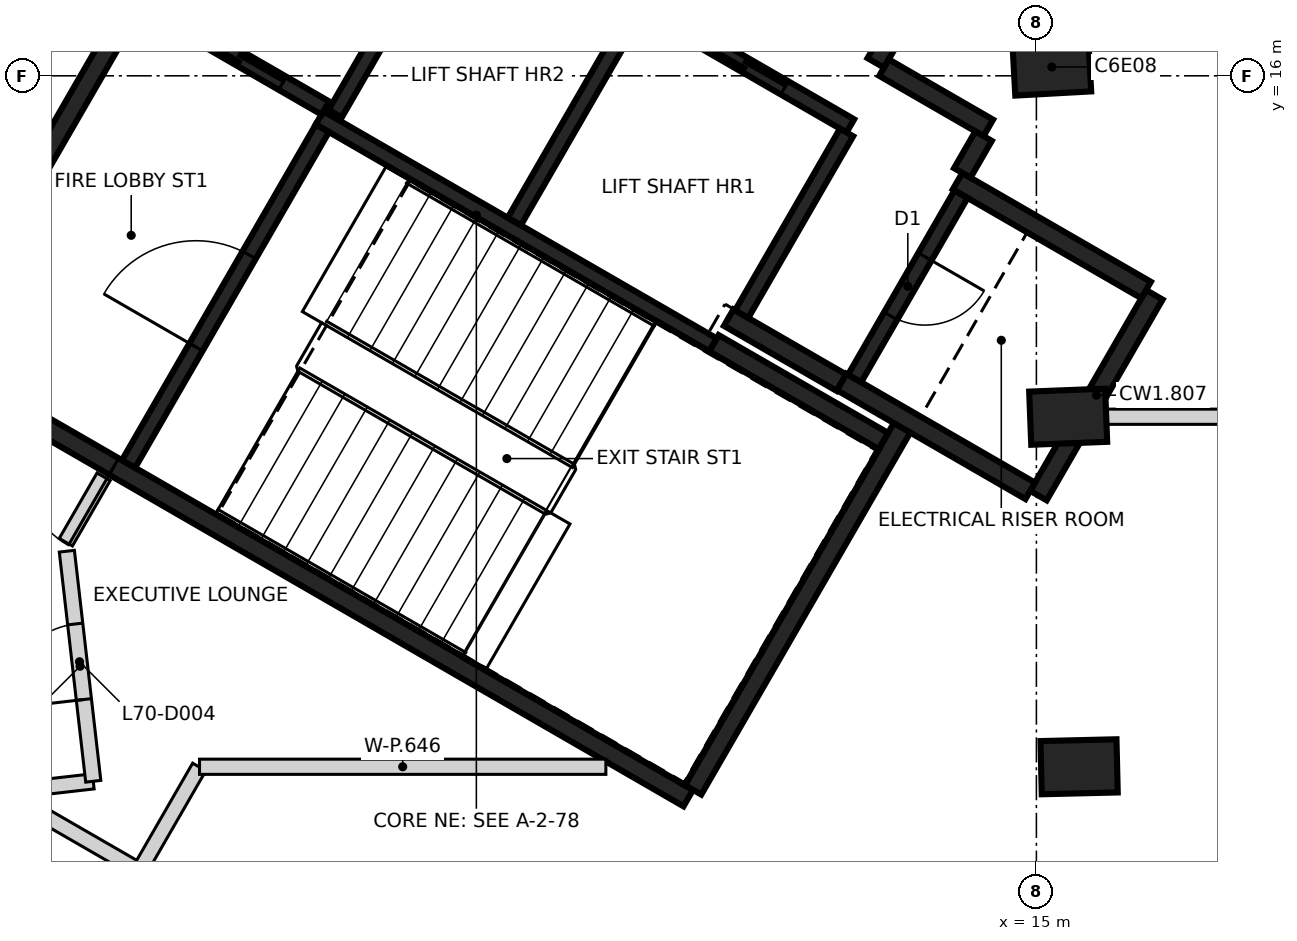
"""IFC4 building model, lengths in metres.
Left out: names, types, materials, properties, quantities, classifications, styles, units other than length and angle.
Written with IfcOpenShell. Run it as: python <this file> out.ifc"""

import sys

from ifc_helpers import new_model, si_unit, direction, frame, frame_2d, origin, origin_2d, place, context, subcontext, project, spatial, rectangle, extrude, element, fill, save


model = new_model("IFC4")
c1 = context("Model", 3, precision=1e-05, world=origin(), true_north=direction((0.0, 1.0)))
c2 = subcontext(c1, "Body", "Model", "MODEL_VIEW")
j1 = project(units=[si_unit("LENGTHUNIT", "METRE"), si_unit("PLANEANGLEUNIT", "RADIAN")], contexts=[c1])
p1 = place(None, origin())
s1 = spatial("IfcSite", under=j1, at=p1, CompositionType="ELEMENT")
p2 = place(p1, origin())
s2 = spatial("IfcBuilding", under=s1, at=p2, CompositionType="ELEMENT")
p3 = place(p2, frame((0.0, 0.0, 276.6)))
s3 = spatial("IfcBuildingStorey", under=s2, at=p3, CompositionType="ELEMENT", Elevation=276.6)
for number, where, z_axis, x_axis in (
    (1, (15.562, 6.91, -0.35), (0.0, 0.0, 1.0), (1.0, 0.024, 0.0)),
    (2, (15.418, 11.515, -0.35), (0.0, 0.0, 1.0), (0.999, 0.039, 0.0)),
    (3, (15.202, 16.117, -0.35), (0.0, 0.0, 1.0), (0.998, 0.055, 0.0)),
):
    element("IfcColumn", number, at=place(p3, frame(where, z_axis=z_axis, x_axis=x_axis)), inside=s3, PredefinedType="COLUMN", context=c2, shape_type="SweptSolid", body=[
        extrude(rectangle(XDim=1.0, YDim=0.7, at=origin_2d()), origin(), (0.0, 0.0, 1.0), 3.6),
    ])
p4 = place(p3, frame((10.42, 6.498, 0.0), z_axis=(0.0, 0.0, 1.0), x_axis=(-0.866021906294, 0.500006057782, 0.0)))
e4 = element("IfcWall", 4, at=p4, inside=s3, PredefinedType="SHEAR", context=c2, shape_type="SweptSolid", body=[
    extrude(rectangle(XDim=11.55, YDim=0.25, at=frame_2d((5.775, 0.0))), origin(), (0.0, 0.0, 1.0), 3.25),
])
p5 = place(p4, frame((10.025, 0.0, 0.0)))
e5 = element("IfcOpeningElement", 5, at=p5, cuts=e4, PredefinedType="OPENING", context=c2, shape_type="SweptSolid", body=[
    extrude(rectangle(XDim=1.2, YDim=2.1, at=frame_2d((0.6, 1.05))), frame((0.0, 0.135, 0.0), z_axis=(0.0, -1.0, 0.0), x_axis=(1.0, 0.0, 0.0)), (0.0, 0.0, 1.0), 0.27),
])
p6 = place(p4, frame((8.725, 0.0, 0.0)))
e6 = element("IfcOpeningElement", 6, at=p6, cuts=e4, PredefinedType="OPENING", context=c2, shape_type="SweptSolid", body=[
    extrude(rectangle(XDim=1.2, YDim=2.1, at=frame_2d((0.6, 1.05))), frame((0.0, 0.135, 0.0), z_axis=(0.0, -1.0, 0.0), x_axis=(1.0, 0.0, 0.0)), (0.0, 0.0, 1.0), 0.27),
])
p7 = place(p3, frame((0.48, 12.381, 0.0), z_axis=(0.0, 0.0, 1.0), x_axis=(0.49999885962, 0.866026062182, 0.0)))
e7 = element("IfcWall", 7, at=p7, inside=s3, PredefinedType="SHEAR", context=c2, shape_type="SweptSolid", body=[
    extrude(rectangle(XDim=5.225, YDim=0.25, at=frame_2d((2.612, 0.0))), origin(), (0.0, 0.0, 1.0), 3.25),
])
p8 = place(p3, frame((13.238, 11.378, 0.0), z_axis=(0.0, 0.0, 1.0), x_axis=(-0.500008851346, -0.866020293397, 0.0)))
e8 = element("IfcWall", 8, at=p8, inside=s3, PredefinedType="SHEAR", context=c2, shape_type="SweptSolid", body=[
    extrude(rectangle(XDim=5.51, YDim=0.25, at=frame_2d((2.755, 0.0))), origin(), (0.0, 0.0, 1.0), 3.25),
])
p9 = place(p3, frame((16.552, 13.119, 0.0), z_axis=(0.0, 0.0, 1.0), x_axis=(-0.499978833458, -0.866037623948, 0.0)))
e9 = element("IfcWall", 9, at=p9, inside=s3, PredefinedType="SHEAR", context=c2, shape_type="SweptSolid", body=[
    extrude(rectangle(XDim=3.05, YDim=0.25, at=frame_2d((1.525, 0.0))), origin(), (0.0, 0.0, 1.0), 3.25),
])
p10 = place(p3, frame((14.918, 10.54, 0.0), z_axis=(0.0, 0.0, 1.0), x_axis=(-0.866063538972, 0.499933942099, 0.0)))
e10 = element("IfcWall", 10, at=p10, inside=s3, PredefinedType="SHEAR", context=c2, shape_type="SweptSolid", body=[
    extrude(rectangle(XDim=2.865, YDim=0.25, at=frame_2d((1.432, 0.0))), origin(), (0.0, 0.0, 1.0), 3.25),
])
p11 = place(p3, frame((13.963, 14.614, 0.0), z_axis=(0.0, 0.0, 1.0), x_axis=(0.866042235819, -0.499970844928, 0.0)))
e11 = element("IfcWall", 11, at=p11, inside=s3, PredefinedType="SHEAR", context=c2, shape_type="SweptSolid", body=[
    extrude(rectangle(XDim=2.865, YDim=0.25, at=frame_2d((1.432, 0.0))), origin(), (0.0, 0.0, 1.0), 3.25),
])
p12 = place(p3, frame((10.757, 12.481, 0.0), z_axis=(0.0, 0.0, 1.0), x_axis=(0.866022940537, -0.500004266446, 0.0)))
e12 = element("IfcWall", 12, at=p12, inside=s3, PredefinedType="SHEAR", context=c2, shape_type="SweptSolid", body=[
    extrude(rectangle(XDim=2.575, YDim=0.25, at=frame_2d((1.287, 0.0))), origin(), (0.0, 0.0, 1.0), 3.25),
])
p13 = place(p3, frame((13.819, 17.785, 0.0), z_axis=(0.0, 0.0, 1.0), x_axis=(-0.500039802285, -0.866002422705, 0.0)))
e13 = element("IfcWall", 13, at=p13, inside=s3, PredefinedType="SHEAR", context=c2, shape_type="SweptSolid", body=[
    extrude(rectangle(XDim=1.865, YDim=0.25, at=frame_2d((0.932, 0.0))), origin(), (0.0, 0.0, 1.0), 3.25),
])
p14 = place(p3, frame((12.433, 11.964, 0.0), z_axis=(0.0, 0.0, 1.0), x_axis=(-0.866038183914, 0.499977863513, 0.0)))
e14 = element("IfcWall", 14, at=p14, inside=s3, PredefinedType="SHEAR", context=c2, shape_type="SweptSolid", body=[
    extrude(rectangle(XDim=1.71, YDim=0.25, at=frame_2d((0.855, 0.0))), origin(), (0.0, 0.0, 1.0), 3.25),
])
p15 = place(p3, frame((12.995, 16.108, 0.0), z_axis=(0.0, 0.0, 1.0), x_axis=(0.866044474677, -0.49996696679, 0.0)))
e15 = element("IfcWall", 15, at=p15, inside=s3, PredefinedType="SHEAR", context=c2, shape_type="SweptSolid", body=[
    extrude(rectangle(XDim=1.584, YDim=0.25, at=frame_2d((0.792, 0.0))), origin(), (0.0, 0.0, 1.0), 3.25),
])
p16 = place(p3, frame((14.305, 15.207, 0.0), z_axis=(0.0, 0.0, 1.0), x_axis=(-0.499848422343, -0.866112899501, 0.0)))
e16 = element("IfcWall", 16, at=p16, inside=s3, PredefinedType="SHEAR", context=c2, shape_type="SweptSolid", body=[
    extrude(rectangle(XDim=0.559, YDim=0.25, at=frame_2d((0.28, 0.0))), origin(), (0.0, 0.0, 1.0), 3.25),
])
p17 = place(p3, frame((12.552, 15.342, 0.0), z_axis=(0.0, 0.0, 1.0), x_axis=(-0.866030299012, 0.499991521122, 0.0)))
e17 = element("IfcWall", 17, at=p17, inside=s3, PredefinedType="SHEAR", context=c2, shape_type="SweptSolid", body=[
    extrude(rectangle(XDim=6.1, YDim=0.2, at=frame_2d((3.05, 0.0))), origin(), (0.0, 0.0, 1.0), 3.25),
])
p18 = place(p17, frame((1.0, 0.0, 0.0)))
e18 = element("IfcOpeningElement", 18, at=p18, cuts=e17, PredefinedType="OPENING", context=c2, shape_type="SweptSolid", body=[
    extrude(rectangle(XDim=1.2, YDim=2.1, at=frame_2d((0.6, 1.05))), frame((0.0, 0.11, 0.0), z_axis=(0.0, -1.0, 0.0), x_axis=(1.0, 0.0, 0.0)), (0.0, 0.0, 1.0), 0.22),
])
p19 = place(p17, frame((3.982, 0.0, 0.0)))
e19 = element("IfcOpeningElement", 19, at=p19, cuts=e17, PredefinedType="OPENING", context=c2, shape_type="SweptSolid", body=[
    extrude(rectangle(XDim=1.2, YDim=2.1, at=frame_2d((0.6, 1.05))), frame((0.0, 0.11, 0.0), z_axis=(0.0, -1.0, 0.0), x_axis=(1.0, 0.0, 0.0)), (0.0, 0.0, 1.0), 0.22),
])
p20 = place(p3, frame((10.743, 12.46, 0.0), z_axis=(0.0, 0.0, 1.0), x_axis=(-0.866018848283, 0.500011354289, 0.0)))
e20 = element("IfcWall", 20, at=p20, inside=s3, PredefinedType="SHEAR", context=c2, shape_type="SweptSolid", body=[
    extrude(rectangle(XDim=5.974, YDim=0.2, at=frame_2d((2.987, 0.0))), origin(), (0.0, 0.0, 1.0), 3.25),
])
p21 = place(p3, frame((3.057, 10.895, 0.0), z_axis=(0.0, 0.0, 1.0), x_axis=(0.500027839223, 0.866009330205, 0.0)))
e21 = element("IfcWall", 21, at=p21, inside=s3, PredefinedType="SHEAR", context=c2, shape_type="SweptSolid", body=[
    extrude(rectangle(XDim=5.098, YDim=0.2, at=frame_2d((2.549, 0.0))), origin(), (0.0, 0.0, 1.0), 3.25),
])
p22 = place(p21, frame((1.774, 0.0, 0.0)))
e22 = element("IfcOpeningElement", 22, at=p22, cuts=e21, PredefinedType="OPENING", context=c2, shape_type="SweptSolid", body=[
    extrude(rectangle(XDim=1.4, YDim=2.1, at=frame_2d((0.7, 1.05))), frame((0.0, 0.11, 0.0), z_axis=(0.0, -1.0, 0.0), x_axis=(1.0, 0.0, 0.0)), (0.0, 0.0, 1.0), 0.22),
])
p23 = place(p3, frame((8.132, 14.084, 0.0), z_axis=(0.0, 0.0, 1.0), x_axis=(0.500030834389, 0.86600760081, 0.0)))
e23 = element("IfcWall", 23, at=p23, inside=s3, PredefinedType="SHEAR", context=c2, shape_type="SweptSolid", body=[
    extrude(rectangle(XDim=3.198, YDim=0.2, at=frame_2d((1.599, 0.0))), origin(), (0.0, 0.0, 1.0), 3.25),
])
p24 = place(p3, frame((14.008, 14.442, 0.0), z_axis=(0.0, 0.0, 1.0), x_axis=(-0.499986818241, -0.866033014143, 0.0)))
e24 = element("IfcWall", 24, at=p24, inside=s3, PredefinedType="SHEAR", context=c2, shape_type="SweptSolid", body=[
    extrude(rectangle(XDim=2.798, YDim=0.2, at=frame_2d((1.399, 0.0))), origin(), (0.0, 0.0, 1.0), 3.25),
])
p25 = place(p24, frame((0.949, 0.0, 0.0)))
e25 = element("IfcOpeningElement", 25, at=p25, cuts=e24, PredefinedType="OPENING", context=c2, shape_type="SweptSolid", body=[
    extrude(rectangle(XDim=0.9, YDim=2.1, at=frame_2d((0.45, 1.05))), frame((0.0, 0.11, 0.0), z_axis=(0.0, -1.0, 0.0), x_axis=(1.0, 0.0, 0.0)), (0.0, 0.0, 1.0), 0.22),
])
p26 = place(p3, frame((12.502, 15.255, 0.0), z_axis=(0.0, 0.0, 1.0), x_axis=(-0.499965018551, -0.866045599391, 0.0)))
e26 = element("IfcWall", 26, at=p26, inside=s3, PredefinedType="SHEAR", context=c2, shape_type="SweptSolid", body=[
    extrude(rectangle(XDim=2.759, YDim=0.2, at=frame_2d((1.379, 0.0))), origin(), (0.0, 0.0, 1.0), 3.25),
])
p27 = place(p3, frame((7.324, 18.187, 0.0), z_axis=(0.0, 0.0, 1.0), x_axis=(-0.499967891604, -0.866043940782, 0.0)))
e27 = element("IfcWall", 27, at=p27, inside=s3, PredefinedType="SHEAR", context=c2, shape_type="SweptSolid", body=[
    extrude(rectangle(XDim=3.1, YDim=0.2, at=frame_2d((1.55, 0.0))), origin(), (0.0, 0.0, 1.0), 3.25),
])
p28 = place(p3, frame((5.646, 15.576, 0.0), z_axis=(0.0, 0.0, 1.0), x_axis=(-0.866018407898, 0.500012117035, 0.0)))
e28 = element("IfcWall", 28, at=p28, inside=s3, PredefinedType="SHEAR", context=c2, shape_type="SweptSolid", body=[
    extrude(rectangle(XDim=2.651, YDim=0.2, at=frame_2d((1.325, 0.0))), origin(), (0.0, 0.0, 1.0), 3.25),
])
p29 = place(p28, frame((0.652, 0.0, 0.0)))
e29 = element("IfcOpeningElement", 29, at=p29, cuts=e28, PredefinedType="OPENING", context=c2, shape_type="SweptSolid", body=[
    extrude(rectangle(XDim=1.3, YDim=2.1, at=frame_2d((0.65, 1.05))), frame((0.0, 0.11, 0.0), z_axis=(0.0, -1.0, 0.0), x_axis=(1.0, 0.0, 0.0)), (0.0, 0.0, 1.0), 0.22),
])
p30 = place(p3, frame((-1.086, 12.65, 0.0), z_axis=(0.0, 0.0, 1.0), x_axis=(0.492563383526, 0.870276572826, 0.0)))
e30 = element("IfcWall", 30, at=p30, inside=s3, PredefinedType="PARTITIONING", context=c2, shape_type="SweptSolid", body=[
    extrude(rectangle(XDim=6.309, YDim=0.2, at=frame_2d((3.155, 0.0))), origin(), (0.0, 0.0, 1.0), 3.25),
])
p31 = place(p30, frame((3.533, 0.0, 0.0)))
e31 = element("IfcOpeningElement", 31, at=p31, cuts=e30, PredefinedType="OPENING", context=c2, shape_type="SweptSolid", body=[
    extrude(rectangle(XDim=1.0, YDim=2.1, at=frame_2d((0.5, 1.05))), frame((0.0, 0.11, 0.0), z_axis=(0.0, -1.0, 0.0), x_axis=(1.0, 0.0, 0.0)), (0.0, 0.0, 1.0), 0.22),
])
p32 = place(p3, frame((1.4, 6.582, 0.0), z_axis=(0.0, 0.0, 1.0), x_axis=(0.993556915844, 0.11333426216, 0.0)))
e32 = element("IfcWall", 32, at=p32, inside=s3, PredefinedType="PARTITIONING", context=c2, shape_type="SweptSolid", body=[
    extrude(rectangle(XDim=1.2, YDim=0.2, at=frame_2d((0.6, 0.0))), origin(), (0.0, 0.0, 1.0), 3.25),
])
p33 = place(p3, frame((1.4, 6.582, 0.0), z_axis=(0.0, 0.0, 1.0), x_axis=(0.866066271601, -0.499929208183, 0.0)))
e33 = element("IfcWall", 33, at=p33, inside=s3, PredefinedType="PARTITIONING", context=c2, shape_type="SweptSolid", body=[
    extrude(rectangle(XDim=2.078, YDim=0.2, at=frame_2d((1.039, 0.0))), origin(), (0.0, 0.0, 1.0), 3.25),
])
p34 = place(p3, frame((2.592, 6.719, 0.0), z_axis=(0.0, 0.0, 1.0), x_axis=(-0.114027951455, 0.993477541914, 0.0)))
e34 = element("IfcWall", 34, at=p34, inside=s3, PredefinedType="PARTITIONING", context=c2, shape_type="SweptSolid", body=[
    extrude(rectangle(XDim=3.047, YDim=0.2, at=frame_2d((1.523, 0.0))), origin(), (0.0, 0.0, 1.0), 3.25),
])
p35 = place(p34, frame((1.083, 0.0, 0.0)))
e35 = element("IfcOpeningElement", 35, at=p35, cuts=e34, PredefinedType="OPENING", context=c2, shape_type="SweptSolid", body=[
    extrude(rectangle(XDim=1.0, YDim=2.1, at=frame_2d((0.5, 1.05))), frame((0.0, 0.11, 0.0), z_axis=(0.0, -1.0, 0.0), x_axis=(1.0, 0.0, 0.0)), (0.0, 0.0, 1.0), 0.22),
])
p36 = place(p3, frame((2.231, 9.864, 0.0), z_axis=(0.0, 0.0, 1.0), x_axis=(0.499942098031, 0.866058830921, 0.0)))
e36 = element("IfcWall", 36, at=p36, inside=s3, PredefinedType="PARTITIONING", context=c2, shape_type="SweptSolid", body=[
    extrude(rectangle(XDim=0.994, YDim=0.2, at=frame_2d((0.497, 0.0))), origin(), (0.0, 0.0, 1.0), 3.25),
])
p37 = place(p3, frame((3.2, 5.543, 0.0), z_axis=(0.0, 0.0, 1.0), x_axis=(0.499342032259, 0.86640494852, 0.0)))
e37 = element("IfcWall", 37, at=p37, inside=s3, PredefinedType="PARTITIONING", context=c2, shape_type="SweptSolid", body=[
    extrude(rectangle(XDim=1.574, YDim=0.2, at=frame_2d((0.787, 0.0))), origin(), (0.0, 0.0, 1.0), 3.25),
])
p38 = place(p3, frame((3.99, 6.91, 0.0), z_axis=(0.0, 0.0, 1.0), x_axis=(1.0, 0.0, 0.0)))
e38 = element("IfcWall", 38, at=p38, inside=s3, PredefinedType="PARTITIONING", context=c2, shape_type="SweptSolid", body=[
    extrude(rectangle(XDim=5.346, YDim=0.2, at=frame_2d((2.673, 0.0))), origin(), (0.0, 0.0, 1.0), 3.25),
])
p39 = place(p3, frame((15.84, 11.515, 0.0), z_axis=(0.0, 0.0, 1.0), x_axis=(1.0, 0.0, 0.0)))
e39 = element("IfcWall", 39, at=p39, inside=s3, PredefinedType="PARTITIONING", context=c2, shape_type="SweptSolid", body=[
    extrude(rectangle(XDim=2.025, YDim=0.2, at=frame_2d((1.012, 0.0))), origin(), (0.0, 0.0, 1.0), 3.25),
])
p40 = place(p29, origin())
e40 = element("IfcDoor", 40, at=p40, inside=s3, OperationType="SLIDING_TO_RIGHT", PredefinedType="DOOR", context=c2, shape_type="SweptSolid", body=[
    extrude(rectangle(XDim=1.3, YDim=2.1, at=frame_2d((0.65, 1.05))), frame((0.0, 0.025, 0.0), z_axis=(0.0, -1.0, 0.0), x_axis=(1.0, 0.0, 0.0)), (0.0, 0.0, 1.0), 0.05),
])
fill(e29, e40)
p41 = place(p18, origin())
e41 = element("IfcDoor", 41, at=p41, inside=s3, OperationType="DOUBLE_DOOR_SLIDING", PredefinedType="DOOR", context=c2, shape_type="SweptSolid", body=[
    extrude(rectangle(XDim=1.2, YDim=2.1, at=frame_2d((0.6, 1.05))), frame((0.0, 0.025, 0.0), z_axis=(0.0, -1.0, 0.0), x_axis=(1.0, 0.0, 0.0)), (0.0, 0.0, 1.0), 0.05),
])
fill(e18, e41)
p42 = place(p6, origin())
e42 = element("IfcDoor", 42, at=p42, inside=s3, OperationType="SINGLE_SWING_RIGHT", PredefinedType="DOOR", context=c2, shape_type="SweptSolid", body=[
    extrude(rectangle(XDim=1.2, YDim=2.1, at=frame_2d((0.6, 1.05))), frame((0.0, 0.025, 0.0), z_axis=(0.0, -1.0, 0.0), x_axis=(1.0, 0.0, 0.0)), (0.0, 0.0, 1.0), 0.05),
])
fill(e6, e42)
p43 = place(p22, origin())
e43 = element("IfcDoor", 43, at=p43, inside=s3, OperationType="SINGLE_SWING_RIGHT", PredefinedType="DOOR", context=c2, shape_type="SweptSolid", body=[
    extrude(rectangle(XDim=1.4, YDim=2.1, at=frame_2d((0.7, 1.05))), frame((0.0, 0.025, 0.0), z_axis=(0.0, -1.0, 0.0), x_axis=(1.0, 0.0, 0.0)), (0.0, 0.0, 1.0), 0.05),
])
fill(e22, e43)
p44 = place(p25, origin())
e44 = element("IfcDoor", 44, at=p44, inside=s3, OperationType="SINGLE_SWING_LEFT", PredefinedType="DOOR", context=c2, shape_type="SweptSolid", body=[
    extrude(rectangle(XDim=0.9, YDim=2.1, at=frame_2d((0.45, 1.05))), frame((0.0, 0.025, 0.0), z_axis=(0.0, -1.0, 0.0), x_axis=(1.0, 0.0, 0.0)), (0.0, 0.0, 1.0), 0.05),
])
fill(e25, e44)
p45 = place(p35, origin())
e45 = element("IfcDoor", 45, at=p45, inside=s3, OperationType="SINGLE_SWING_LEFT", PredefinedType="DOOR", context=c2, shape_type="SweptSolid", body=[
    extrude(rectangle(XDim=1.0, YDim=2.1, at=frame_2d((0.5, 1.05))), frame((0.0, 0.025, 0.0), z_axis=(0.0, -1.0, 0.0), x_axis=(1.0, 0.0, 0.0)), (0.0, 0.0, 1.0), 0.05),
])
fill(e35, e45)
save(model, sys.argv[1])
